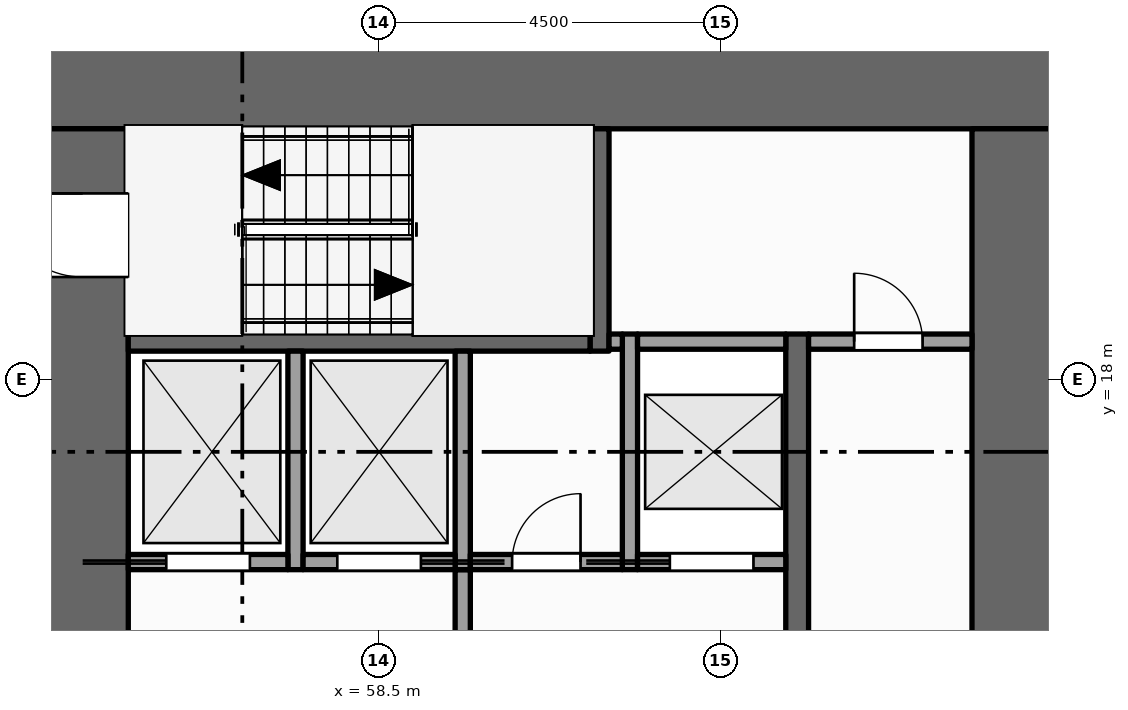
"""IFC4 building model, lengths in metres.
Left out: names, types, materials, properties, quantities, classifications, styles, units other than length and angle.
Written with IfcOpenShell. Run it as: python <this file> out.ifc"""

import sys

from ifc_helpers import new_model, si_unit, direction, frame, frame_2d, origin, place, context, subcontext, project, spatial, rectangle, extrude, element, fill, save


model = new_model("IFC4")
c1 = context("Model", 3, precision=1e-05, world=origin(), true_north=direction((0.0, 1.0)))
c2 = subcontext(c1, "Body", "Model", "MODEL_VIEW")
j1 = project(units=[si_unit("LENGTHUNIT", "METRE"), si_unit("PLANEANGLEUNIT", "RADIAN")], contexts=[c1])
p1 = place(None, origin())
s1 = spatial("IfcSite", under=j1, at=p1, CompositionType="ELEMENT")
p2 = place(p1, origin())
s2 = spatial("IfcBuilding", under=s1, at=p2, CompositionType="ELEMENT")
p3 = place(p2, frame((0.0, 0.0, 8.0)))
s3 = spatial("IfcBuildingStorey", under=s2, at=p3, CompositionType="ELEMENT", Elevation=8.0)
p4 = place(p3, frame((54.0, 21.9, -0.15), z_axis=(0.0, 0.0, 1.0), x_axis=(1.0, 0.0, 0.0)))
e1 = element("IfcWall", 1, at=p4, inside=s3, PredefinedType="SHEAR", context=c2, shape_type="SweptSolid", body=[
    extrude(rectangle(XDim=13.5, YDim=1.2, at=frame_2d((6.75, 0.0))), origin(), (0.0, 0.0, 1.0), 6.0),
])
p5 = place(p3, frame((54.6, 1.2, -0.15), z_axis=(0.0, 0.0, 1.0), x_axis=(0.0, 1.0, 0.0)))
e2 = element("IfcWall", 2, at=p5, inside=s3, PredefinedType="SHEAR", context=c2, shape_type="SweptSolid", body=[
    extrude(rectangle(XDim=20.1, YDim=1.2, at=frame_2d((10.05, 0.0))), origin(), (0.0, 0.0, 1.0), 6.0),
])
p6 = place(p5, frame((5.9, 0.0, 0.15)))
e3 = element("IfcOpeningElement", 3, at=p6, cuts=e2, PredefinedType="OPENING", context=c2, shape_type="SweptSolid", body=[
    extrude(rectangle(XDim=1.8, YDim=2.1, at=frame_2d((0.9, 1.05))), frame((0.0, 0.61, 0.0), z_axis=(0.0, -1.0, 0.0), x_axis=(1.0, 0.0, 0.0)), (0.0, 0.0, 1.0), 1.22),
])
p7 = place(p5, frame((11.95, 0.0, 0.15)))
e4 = element("IfcOpeningElement", 4, at=p7, cuts=e2, PredefinedType="OPENING", context=c2, shape_type="SweptSolid", body=[
    extrude(rectangle(XDim=1.1, YDim=2.1, at=frame_2d((0.55, 1.05))), frame((0.0, 0.61, 0.0), z_axis=(0.0, -1.0, 0.0), x_axis=(1.0, 0.0, 0.0)), (0.0, 0.0, 1.0), 1.22),
])
p8 = place(p5, frame((0.95, 0.0, 0.15)))
e5 = element("IfcOpeningElement", 5, at=p8, cuts=e2, PredefinedType="OPENING", context=c2, shape_type="SweptSolid", body=[
    extrude(rectangle(XDim=1.1, YDim=2.1, at=frame_2d((0.55, 1.05))), frame((0.0, 0.61, 0.0), z_axis=(0.0, -1.0, 0.0), x_axis=(1.0, 0.0, 0.0)), (0.0, 0.0, 1.0), 1.22),
])
p9 = place(p5, frame((18.15, 0.0, 0.15)))
e6 = element("IfcOpeningElement", 6, at=p9, cuts=e2, PredefinedType="OPENING", context=c2, shape_type="SweptSolid", body=[
    extrude(rectangle(XDim=1.1, YDim=2.1, at=frame_2d((0.55, 1.05))), frame((0.0, 0.61, 0.0), z_axis=(0.0, -1.0, 0.0), x_axis=(1.0, 0.0, 0.0)), (0.0, 0.0, 1.0), 1.22),
])
p10 = place(p3, frame((66.9, 1.2, -0.15), z_axis=(0.0, 0.0, 1.0), x_axis=(0.0, 1.0, 0.0)))
e7 = element("IfcWall", 7, at=p10, inside=s3, PredefinedType="SHEAR", context=c2, shape_type="SweptSolid", body=[
    extrude(rectangle(XDim=20.1, YDim=1.2, at=frame_2d((10.05, 0.0))), origin(), (0.0, 0.0, 1.0), 6.0),
])
p11 = place(p3, frame((57.4, 15.5, 0.0), z_axis=(0.0, 0.0, 1.0), x_axis=(0.0, 1.0, 0.0)))
e8 = element("IfcWall", 8, at=p11, inside=s3, PredefinedType="SOLIDWALL", context=c2, shape_type="SweptSolid", body=[
    extrude(rectangle(XDim=2.875, YDim=0.2, at=frame_2d((1.438, 0.0))), origin(), (0.0, 0.0, 1.0), 5.75),
])
p12 = place(p3, frame((59.6, 11.7, 0.0), z_axis=(0.0, 0.0, 1.0), x_axis=(0.0, 1.0, 0.0)))
e9 = element("IfcWall", 9, at=p12, inside=s3, PredefinedType="PARTITIONING", context=c2, shape_type="SweptSolid", body=[
    extrude(rectangle(XDim=3.8, YDim=0.2, at=frame_2d((1.9, 0.0))), origin(), (0.0, 0.0, 1.0), 5.75),
])
p13 = place(p12, frame((1.5, 0.0, 0.0)))
e10 = element("IfcOpeningElement", 10, at=p13, cuts=e9, PredefinedType="OPENING", context=c2, shape_type="SweptSolid", body=[
    extrude(rectangle(XDim=1.0, YDim=2.1, at=frame_2d((0.5, 1.05))), frame((0.0, 0.11, 0.0), z_axis=(0.0, -1.0, 0.0), x_axis=(1.0, 0.0, 0.0)), (0.0, 0.0, 1.0), 0.22),
])
p14 = place(p3, frame((59.6, 15.5, 0.0), z_axis=(0.0, 0.0, 1.0), x_axis=(0.0, 1.0, 0.0)))
e11 = element("IfcWall", 11, at=p14, inside=s3, PredefinedType="SOLIDWALL", context=c2, shape_type="SweptSolid", body=[
    extrude(rectangle(XDim=2.875, YDim=0.2, at=frame_2d((1.438, 0.0))), origin(), (0.0, 0.0, 1.0), 5.75),
])
p15 = place(p3, frame((61.4, 18.375, 0.0), z_axis=(0.0, 0.0, 1.0), x_axis=(0.0, 1.0, 0.0)))
e12 = element("IfcWall", 12, at=p15, inside=s3, PredefinedType="SHEAR", context=c2, shape_type="SweptSolid", body=[
    extrude(rectangle(XDim=2.925, YDim=0.25, at=frame_2d((1.462, 0.0))), origin(), (0.0, 0.0, 1.0), 5.75),
])
p16 = place(p3, frame((61.8, 15.5, 0.0), z_axis=(0.0, 0.0, 1.0), x_axis=(0.0, 1.0, 0.0)))
e13 = element("IfcWall", 13, at=p16, inside=s3, PredefinedType="SOLIDWALL", context=c2, shape_type="SweptSolid", body=[
    extrude(rectangle(XDim=3.1, YDim=0.2, at=frame_2d((1.55, 0.0))), origin(), (0.0, 0.0, 1.0), 5.75),
])
p17 = place(p3, frame((64.0, 4.1, 0.0), z_axis=(0.0, 0.0, 1.0), x_axis=(0.0, 1.0, 0.0)))
e14 = element("IfcWall", 14, at=p17, inside=s3, PredefinedType="SHEAR", context=c2, shape_type="SweptSolid", body=[
    extrude(rectangle(XDim=14.5, YDim=0.3, at=frame_2d((7.25, 0.0))), origin(), (0.0, 0.0, 1.0), 5.75),
])
p18 = place(p17, frame((3.4, 0.0, 0.0)))
e15 = element("IfcOpeningElement", 15, at=p18, cuts=e14, PredefinedType="OPENING", context=c2, shape_type="SweptSolid", body=[
    extrude(rectangle(XDim=1.0, YDim=2.1, at=frame_2d((0.5, 1.05))), frame((0.0, 0.16, 0.0), z_axis=(0.0, -1.0, 0.0), x_axis=(1.0, 0.0, 0.0)), (0.0, 0.0, 1.0), 0.32),
])
p19 = place(p17, frame((9.1, 0.0, 0.0)))
e16 = element("IfcOpeningElement", 16, at=p19, cuts=e14, PredefinedType="OPENING", context=c2, shape_type="SweptSolid", body=[
    extrude(rectangle(XDim=1.0, YDim=2.1, at=frame_2d((0.5, 1.05))), frame((0.0, 0.16, 0.0), z_axis=(0.0, -1.0, 0.0), x_axis=(1.0, 0.0, 0.0)), (0.0, 0.0, 1.0), 0.32),
])
p20 = place(p3, frame((55.2, 15.6, 0.0), z_axis=(0.0, 0.0, 1.0), x_axis=(1.0, 0.0, 0.0)))
e17 = element("IfcWall", 17, at=p20, inside=s3, PredefinedType="SOLIDWALL", context=c2, shape_type="SweptSolid", body=[
    extrude(rectangle(XDim=2.1, YDim=0.2, at=frame_2d((1.05, 0.0))), origin(), (0.0, 0.0, 1.0), 5.75),
])
p21 = place(p20, frame((0.5, 0.0, 0.012)))
e18 = element("IfcOpeningElement", 18, at=p21, cuts=e17, PredefinedType="OPENING", context=c2, shape_type="SweptSolid", body=[
    extrude(rectangle(XDim=1.1, YDim=2.1, at=frame_2d((0.55, 1.05))), frame((0.0, 0.11, 0.0), z_axis=(0.0, -1.0, 0.0), x_axis=(1.0, 0.0, 0.0)), (0.0, 0.0, 1.0), 0.22),
])
p22 = place(p3, frame((57.5, 15.6, 0.0), z_axis=(0.0, 0.0, 1.0), x_axis=(1.0, 0.0, 0.0)))
e19 = element("IfcWall", 19, at=p22, inside=s3, PredefinedType="SOLIDWALL", context=c2, shape_type="SweptSolid", body=[
    extrude(rectangle(XDim=2.0, YDim=0.2, at=frame_2d((1.0, 0.0))), origin(), (0.0, 0.0, 1.0), 5.75),
])
p23 = place(p22, frame((0.45, 0.0, 0.012)))
e20 = element("IfcOpeningElement", 20, at=p23, cuts=e19, PredefinedType="OPENING", context=c2, shape_type="SweptSolid", body=[
    extrude(rectangle(XDim=1.1, YDim=2.1, at=frame_2d((0.55, 1.05))), frame((0.0, 0.11, 0.0), z_axis=(0.0, -1.0, 0.0), x_axis=(1.0, 0.0, 0.0)), (0.0, 0.0, 1.0), 0.22),
])
p24 = place(p3, frame((59.7, 15.6, 0.0), z_axis=(0.0, 0.0, 1.0), x_axis=(1.0, 0.0, 0.0)))
e21 = element("IfcWall", 21, at=p24, inside=s3, PredefinedType="PARTITIONING", context=c2, shape_type="SweptSolid", body=[
    extrude(rectangle(XDim=2.0, YDim=0.2, at=frame_2d((1.0, 0.0))), origin(), (0.0, 0.0, 1.0), 5.75),
])
p25 = place(p24, frame((0.55, 0.0, 0.0)))
e22 = element("IfcOpeningElement", 22, at=p25, cuts=e21, PredefinedType="OPENING", context=c2, shape_type="SweptSolid", body=[
    extrude(rectangle(XDim=0.9, YDim=2.1, at=frame_2d((0.45, 1.05))), frame((0.0, 0.11, 0.0), z_axis=(0.0, -1.0, 0.0), x_axis=(1.0, 0.0, 0.0)), (0.0, 0.0, 1.0), 0.22),
])
p26 = place(p3, frame((61.9, 15.6, 0.0), z_axis=(0.0, 0.0, 1.0), x_axis=(1.0, 0.0, 0.0)))
e23 = element("IfcWall", 23, at=p26, inside=s3, PredefinedType="SOLIDWALL", context=c2, shape_type="SweptSolid", body=[
    extrude(rectangle(XDim=1.95, YDim=0.2, at=frame_2d((0.975, 0.0))), origin(), (0.0, 0.0, 1.0), 5.75),
])
p27 = place(p26, frame((0.425, 0.0, 0.012)))
e24 = element("IfcOpeningElement", 24, at=p27, cuts=e23, PredefinedType="OPENING", context=c2, shape_type="SweptSolid", body=[
    extrude(rectangle(XDim=1.1, YDim=2.1, at=frame_2d((0.55, 1.05))), frame((0.0, 0.11, 0.0), z_axis=(0.0, -1.0, 0.0), x_axis=(1.0, 0.0, 0.0)), (0.0, 0.0, 1.0), 0.22),
])
p28 = place(p3, frame((55.2, 18.5, 0.0), z_axis=(0.0, 0.0, 1.0), x_axis=(1.0, 0.0, 0.0)))
e25 = element("IfcWall", 25, at=p28, inside=s3, PredefinedType="SHEAR", context=c2, shape_type="SweptSolid", body=[
    extrude(rectangle(XDim=6.075, YDim=0.25, at=frame_2d((3.038, 0.0))), origin(), (0.0, 0.0, 1.0), 5.75),
])
p29 = place(p3, frame((61.525, 18.5, 0.0), z_axis=(0.0, 0.0, 1.0), x_axis=(1.0, 0.0, 0.0)))
e26 = element("IfcWall", 26, at=p29, inside=s3, PredefinedType="PARTITIONING", context=c2, shape_type="SweptSolid", body=[
    extrude(rectangle(XDim=0.175, YDim=0.2, at=frame_2d((0.087, 0.0))), origin(), (0.0, 0.0, 1.0), 5.75),
])
p30 = place(p3, frame((61.9, 18.5, 0.0), z_axis=(0.0, 0.0, 1.0), x_axis=(1.0, 0.0, 0.0)))
e27 = element("IfcWall", 27, at=p30, inside=s3, PredefinedType="SOLIDWALL", context=c2, shape_type="SweptSolid", body=[
    extrude(rectangle(XDim=1.95, YDim=0.2, at=frame_2d((0.975, 0.0))), origin(), (0.0, 0.0, 1.0), 5.75),
])
p31 = place(p3, frame((64.15, 18.5, 0.0), z_axis=(0.0, 0.0, 1.0), x_axis=(1.0, 0.0, 0.0)))
e28 = element("IfcWall", 28, at=p31, inside=s3, PredefinedType="PARTITIONING", context=c2, shape_type="SweptSolid", body=[
    extrude(rectangle(XDim=2.15, YDim=0.2, at=frame_2d((1.075, 0.0))), origin(), (0.0, 0.0, 1.0), 5.75),
])
p32 = place(p31, frame((0.6, 0.0, 0.0)))
e29 = element("IfcOpeningElement", 29, at=p32, cuts=e28, PredefinedType="OPENING", context=c2, shape_type="SweptSolid", body=[
    extrude(rectangle(XDim=0.9, YDim=2.1, at=frame_2d((0.45, 1.05))), frame((0.0, 0.11, 0.0), z_axis=(0.0, -1.0, 0.0), x_axis=(1.0, 0.0, 0.0)), (0.0, 0.0, 1.0), 0.22),
])
p33 = place(p21, origin())
e30 = element("IfcDoor", 30, at=p33, inside=s3, OperationType="SLIDING_TO_LEFT", PredefinedType="DOOR", context=c2, shape_type="SweptSolid", body=[
    extrude(rectangle(XDim=1.1, YDim=2.1, at=frame_2d((0.55, 1.05))), frame((0.0, 0.025, 0.0), z_axis=(0.0, -1.0, 0.0), x_axis=(1.0, 0.0, 0.0)), (0.0, 0.0, 1.0), 0.05),
])
fill(e18, e30)
p34 = place(p23, origin())
e31 = element("IfcDoor", 31, at=p34, inside=s3, OperationType="SLIDING_TO_RIGHT", PredefinedType="DOOR", context=c2, shape_type="SweptSolid", body=[
    extrude(rectangle(XDim=1.1, YDim=2.1, at=frame_2d((0.55, 1.05))), frame((0.0, 0.025, 0.0), z_axis=(0.0, -1.0, 0.0), x_axis=(1.0, 0.0, 0.0)), (0.0, 0.0, 1.0), 0.05),
])
fill(e20, e31)
p35 = place(p27, origin())
e32 = element("IfcDoor", 32, at=p35, inside=s3, OperationType="SLIDING_TO_LEFT", PredefinedType="DOOR", context=c2, shape_type="SweptSolid", body=[
    extrude(rectangle(XDim=1.1, YDim=2.1, at=frame_2d((0.55, 1.05))), frame((0.0, 0.025, 0.0), z_axis=(0.0, -1.0, 0.0), x_axis=(1.0, 0.0, 0.0)), (0.0, 0.0, 1.0), 0.05),
])
fill(e24, e32)
p36 = place(p9, origin())
e33 = element("IfcDoor", 33, at=p36, inside=s3, OperationType="SINGLE_SWING_RIGHT", PredefinedType="DOOR", context=c2, shape_type="SweptSolid", body=[
    extrude(rectangle(XDim=1.1, YDim=2.1, at=frame_2d((0.55, 1.05))), frame((0.0, 0.025, 0.0), z_axis=(0.0, -1.0, 0.0), x_axis=(1.0, 0.0, 0.0)), (0.0, 0.0, 1.0), 0.05),
])
fill(e6, e33)
p37 = place(p32, origin())
e34 = element("IfcDoor", 34, at=p37, inside=s3, OperationType="SINGLE_SWING_LEFT", PredefinedType="DOOR", context=c2, shape_type="SweptSolid", body=[
    extrude(rectangle(XDim=0.9, YDim=2.1, at=frame_2d((0.45, 1.05))), frame((0.0, 0.025, 0.0), z_axis=(0.0, -1.0, 0.0), x_axis=(1.0, 0.0, 0.0)), (0.0, 0.0, 1.0), 0.05),
])
fill(e29, e34)
p38 = place(p25, origin())
e35 = element("IfcDoor", 35, at=p38, inside=s3, OperationType="SINGLE_SWING_RIGHT", PredefinedType="DOOR", context=c2, shape_type="SweptSolid", body=[
    extrude(rectangle(XDim=0.9, YDim=2.1, at=frame_2d((0.45, 1.05))), frame((0.0, 0.025, 0.0), z_axis=(0.0, -1.0, 0.0), x_axis=(1.0, 0.0, 0.0)), (0.0, 0.0, 1.0), 0.05),
])
fill(e22, e35)
save(model, sys.argv[1])
